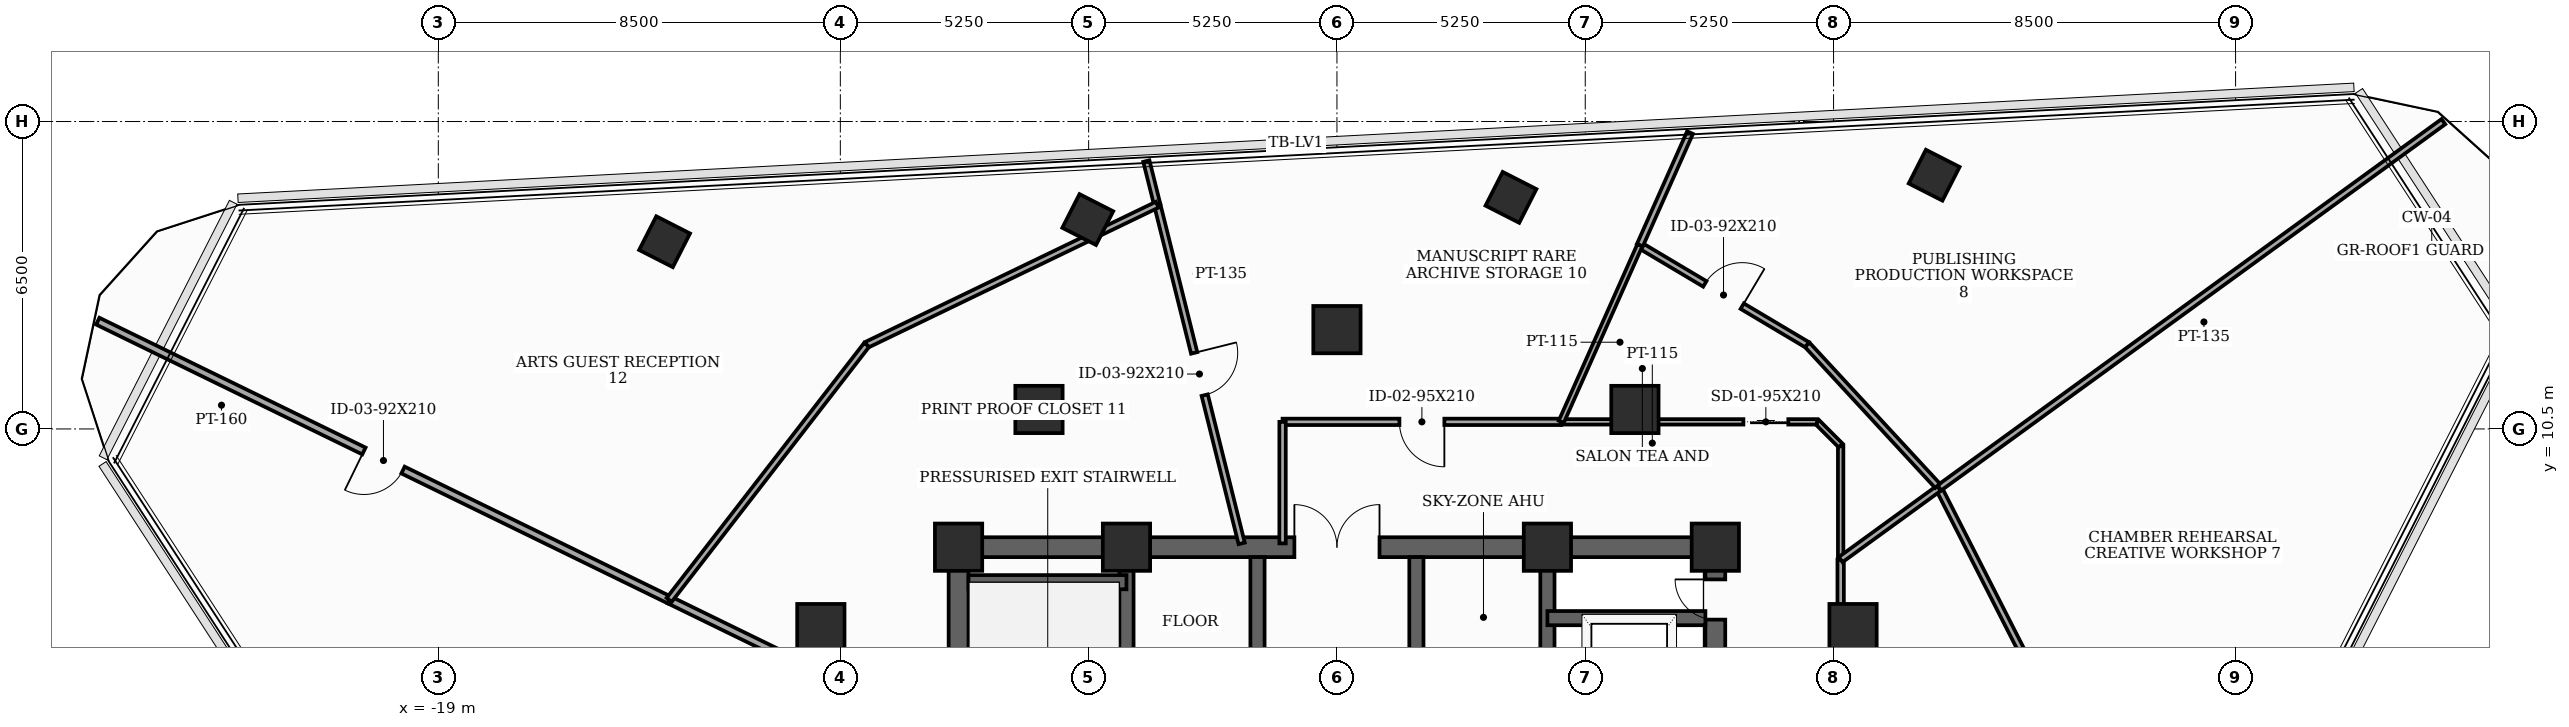
"""IFC4 building model, lengths in metres.
Left out: names, types, materials, properties, quantities, classifications, styles, units other than length and angle.
Written with IfcOpenShell. Run it as: python <this file> out.ifc"""

import sys

from ifc_helpers import new_model, si_unit, direction, frame, frame_2d, origin, origin_2d, place, context, subcontext, project, spatial, rectangle, extrude, element, fill, save


model = new_model("IFC4")
c1 = context("Model", 3, precision=1e-05, world=origin(), true_north=direction((0.0, 1.0)))
c2 = subcontext(c1, "Body", "Model", "MODEL_VIEW")
j1 = project(units=[si_unit("LENGTHUNIT", "METRE"), si_unit("PLANEANGLEUNIT", "RADIAN")], contexts=[c1])
p1 = place(None, origin())
s1 = spatial("IfcSite", under=j1, at=p1, CompositionType="ELEMENT")
p2 = place(p1, origin())
s2 = spatial("IfcBuilding", under=s1, at=p2, CompositionType="ELEMENT")
p3 = place(p2, frame((0.0, 0.0, 248.5)))
s3 = spatial("IfcBuildingStorey", under=s2, at=p3, CompositionType="ELEMENT", Elevation=248.5)
for number, where, z_axis, x_axis in (
    (1, (8.0, 8.0, 0.0), (0.0, 0.0, 1.0), (1.0, 0.0, 0.0)),
    (2, (4.45, 8.0, 0.0), (0.0, 0.0, 1.0), (1.0, 0.0, 0.0)),
    (3, (-4.45, 8.0, 0.0), (0.0, 0.0, 1.0), (1.0, 0.0, 0.0)),
    (4, (-8.0, 8.0, 0.0), (0.0, 0.0, 1.0), (1.0, 0.0, 0.0)),
    (5, (10.912, 6.3, 0.0), (0.0, 0.0, 1.0), (1.0, 0.0, 0.0)),
    (6, (6.3, 10.912, 0.0), (0.0, 0.0, 1.0), (1.0, 0.0, 0.0)),
    (7, (0.0, 12.6, 0.0), (0.0, 0.0, 1.0), (1.0, 0.0, 0.0)),
    (8, (-6.3, 10.912, 0.0), (0.0, 0.0, 1.0), (1.0, 0.0, 0.0)),
    (9, (-10.912, 6.3, 0.0), (0.0, 0.0, 1.0), (1.0, 0.0, 0.0)),
):
    element("IfcColumn", number, at=place(p3, frame(where, z_axis=z_axis, x_axis=x_axis)), inside=s3, PredefinedType="COLUMN", context=c2, shape_type="SweptSolid", body=[
        extrude(rectangle(XDim=1.0, YDim=1.0, at=origin_2d()), origin(), (0.0, 0.0, 1.0), 3.7),
    ])
for number, where, z_axis, x_axis in (
    (10, (12.627, 15.865, 0.0), (0.0, 0.0, 1.0), (0.454, 0.891, 0.0)),
    (11, (3.679, 15.396, 0.0), (0.0, 0.0, 1.0), (0.454, 0.891, 0.0)),
    (12, (-5.269, 14.927, 0.0), (0.0, 0.0, 1.0), (0.454, 0.891, 0.0)),
    (13, (-14.216, 14.458, 0.0), (0.0, 0.0, 1.0), (0.454, 0.891, 0.0)),
):
    element("IfcColumn", number, at=place(p3, frame(where, z_axis=z_axis, x_axis=x_axis)), inside=s3, PredefinedType="COLUMN", context=c2, shape_type="SweptSolid", body=[
        extrude(rectangle(XDim=0.8, YDim=0.8, at=origin_2d()), origin(), (0.0, 0.0, 1.0), 3.7),
    ])
p4 = place(p3, frame((-8.0, -8.0, 0.0), z_axis=(0.0, 0.0, 1.0), x_axis=(0.0, 1.0, 0.0)))
e14 = element("IfcWall", 14, at=p4, inside=s3, PredefinedType="SHEAR", context=c2, shape_type="SweptSolid", body=[
    extrude(rectangle(XDim=16.0, YDim=0.42, at=frame_2d((8.0, 0.0))), origin(), (0.0, 0.0, 1.0), 3.5),
])
p5 = place(p4, frame((0.681, 0.0, 0.0)))
e15 = element("IfcOpeningElement", 15, at=p5, cuts=e14, PredefinedType="OPENING", context=c2, shape_type="SweptSolid", body=[
    extrude(rectangle(XDim=0.85, YDim=2.02, at=frame_2d((0.425, 1.01))), frame((0.0, 0.22, 0.0), z_axis=(0.0, -1.0, 0.0), x_axis=(1.0, 0.0, 0.0)), (0.0, 0.0, 1.0), 0.44),
])
p6 = place(p4, frame((5.35, 0.0, 0.0)))
e16 = element("IfcOpeningElement", 16, at=p6, cuts=e14, PredefinedType="OPENING", context=c2, shape_type="SweptSolid", body=[
    extrude(rectangle(XDim=1.05, YDim=2.15, at=frame_2d((0.525, 1.075))), frame((0.0, 0.22, 0.0), z_axis=(0.0, -1.0, 0.0), x_axis=(1.0, 0.0, 0.0)), (0.0, 0.0, 1.0), 0.44),
])
p7 = place(p3, frame((8.0, -8.0, 0.0), z_axis=(0.0, 0.0, 1.0), x_axis=(0.0, 1.0, 0.0)))
e17 = element("IfcWall", 17, at=p7, inside=s3, PredefinedType="SHEAR", context=c2, shape_type="SweptSolid", body=[
    extrude(rectangle(XDim=16.0, YDim=0.42, at=frame_2d((8.0, 0.0))), origin(), (0.0, 0.0, 1.0), 3.5),
])
p8 = place(p7, frame((9.6, 0.0, 0.0)))
e18 = element("IfcOpeningElement", 18, at=p8, cuts=e17, PredefinedType="OPENING", context=c2, shape_type="SweptSolid", body=[
    extrude(rectangle(XDim=1.05, YDim=2.15, at=frame_2d((0.525, 1.075))), frame((0.0, 0.22, 0.0), z_axis=(0.0, -1.0, 0.0), x_axis=(1.0, 0.0, 0.0)), (0.0, 0.0, 1.0), 0.44),
])
p9 = place(p7, frame((14.469, 0.0, 0.0)))
e19 = element("IfcOpeningElement", 19, at=p9, cuts=e17, PredefinedType="OPENING", context=c2, shape_type="SweptSolid", body=[
    extrude(rectangle(XDim=0.85, YDim=2.02, at=frame_2d((0.425, 1.01))), frame((0.0, 0.22, 0.0), z_axis=(0.0, -1.0, 0.0), x_axis=(1.0, 0.0, 0.0)), (0.0, 0.0, 1.0), 0.44),
])
p10 = place(p3, frame((-8.0, 8.0, 0.0), z_axis=(0.0, 0.0, 1.0), x_axis=(1.0, 0.0, 0.0)))
e20 = element("IfcWall", 20, at=p10, inside=s3, PredefinedType="SHEAR", context=c2, shape_type="SweptSolid", body=[
    extrude(rectangle(XDim=16.0, YDim=0.42, at=frame_2d((8.0, 0.0))), origin(), (0.0, 0.0, 1.0), 3.5),
])
p11 = place(p10, frame((7.1, 0.0, 0.0)))
e21 = element("IfcOpeningElement", 21, at=p11, cuts=e20, PredefinedType="OPENING", context=c2, shape_type="SweptSolid", body=[
    extrude(rectangle(XDim=1.8, YDim=2.15, at=frame_2d((0.9, 1.075))), frame((0.0, 0.22, 0.0), z_axis=(0.0, -1.0, 0.0), x_axis=(1.0, 0.0, 0.0)), (0.0, 0.0, 1.0), 0.44),
])
for number, where, z_axis, x_axis in (
    (22, (-4.45, -7.79, 0.0), (0.0, 0.0, 1.0), (0.0, 1.0, 0.0)),
    (23, (4.45, -7.79, 0.0), (0.0, 0.0, 1.0), (0.0, 1.0, 0.0)),
):
    element("IfcWall", number, at=place(p3, frame(where, z_axis=z_axis, x_axis=x_axis)), inside=s3, PredefinedType="SHEAR", context=c2, shape_type="SweptSolid", body=[
        extrude(rectangle(XDim=15.58, YDim=0.3, at=frame_2d((7.79, 0.0))), origin(), (0.0, 0.0, 1.0), 3.5),
    ])
for number, where, z_axis, x_axis in (
    (24, (-7.79, 7.26, 0.0), (0.0, 0.0, 1.0), (1.0, 0.0, 0.0)),
    (25, (4.45, 6.5, 0.0), (0.0, 0.0, 1.0), (1.0, 0.0, 0.0)),
):
    element("IfcWall", number, at=place(p3, frame(where, z_axis=z_axis, x_axis=x_axis)), inside=s3, PredefinedType="SHEAR", context=c2, shape_type="SweptSolid", body=[
        extrude(rectangle(XDim=3.34, YDim=0.3, at=frame_2d((1.67, 0.0))), origin(), (0.0, 0.0, 1.0), 3.5),
    ])
p12 = place(p3, frame((-1.68, -4.85, 0.0), z_axis=(0.0, 0.0, 1.0), x_axis=(0.0, 1.0, 0.0)))
e26 = element("IfcWall", 26, at=p12, inside=s3, PredefinedType="SHEAR", context=c2, shape_type="SweptSolid", body=[
    extrude(rectangle(XDim=12.64, YDim=0.3, at=frame_2d((6.32, 0.0))), origin(), (0.0, 0.0, 1.0), 3.5),
])
p13 = place(p12, frame((2.6, 0.0, 0.0)))
e27 = element("IfcOpeningElement", 27, at=p13, cuts=e26, PredefinedType="OPENING", context=c2, shape_type="SweptSolid", body=[
    extrude(rectangle(XDim=0.95, YDim=2.1, at=frame_2d((0.475, 1.05))), frame((0.0, 0.16, 0.0), z_axis=(0.0, -1.0, 0.0), x_axis=(1.0, 0.0, 0.0)), (0.0, 0.0, 1.0), 0.32),
])
p14 = place(p12, frame((8.8, 0.0, 0.0)))
e28 = element("IfcOpeningElement", 28, at=p14, cuts=e26, PredefinedType="OPENING", context=c2, shape_type="SweptSolid", body=[
    extrude(rectangle(XDim=0.95, YDim=2.1, at=frame_2d((0.475, 1.05))), frame((0.0, 0.16, 0.0), z_axis=(0.0, -1.0, 0.0), x_axis=(1.0, 0.0, 0.0)), (0.0, 0.0, 1.0), 0.32),
])
p15 = place(p3, frame((1.68, -4.85, 0.0), z_axis=(0.0, 0.0, 1.0), x_axis=(0.0, 1.0, 0.0)))
e29 = element("IfcWall", 29, at=p15, inside=s3, PredefinedType="SHEAR", context=c2, shape_type="SweptSolid", body=[
    extrude(rectangle(XDim=12.64, YDim=0.3, at=frame_2d((6.32, 0.0))), origin(), (0.0, 0.0, 1.0), 3.5),
])
p16 = place(p15, frame((0.55, 0.0, 0.0)))
e30 = element("IfcOpeningElement", 30, at=p16, cuts=e29, PredefinedType="OPENING", context=c2, shape_type="SweptSolid", body=[
    extrude(rectangle(XDim=1.1, YDim=2.1, at=frame_2d((0.55, 1.05))), frame((0.0, 0.16, 0.0), z_axis=(0.0, -1.0, 0.0), x_axis=(1.0, 0.0, 0.0)), (0.0, 0.0, 1.0), 0.32),
])
p17 = place(p15, frame((2.65, 0.0, 0.0)))
e31 = element("IfcOpeningElement", 31, at=p17, cuts=e29, PredefinedType="OPENING", context=c2, shape_type="SweptSolid", body=[
    extrude(rectangle(XDim=1.1, YDim=2.1, at=frame_2d((0.55, 1.05))), frame((0.0, 0.16, 0.0), z_axis=(0.0, -1.0, 0.0), x_axis=(1.0, 0.0, 0.0)), (0.0, 0.0, 1.0), 0.32),
])
p18 = place(p15, frame((4.75, 0.0, 0.0)))
e32 = element("IfcOpeningElement", 32, at=p18, cuts=e29, PredefinedType="OPENING", context=c2, shape_type="SweptSolid", body=[
    extrude(rectangle(XDim=1.1, YDim=2.1, at=frame_2d((0.55, 1.05))), frame((0.0, 0.16, 0.0), z_axis=(0.0, -1.0, 0.0), x_axis=(1.0, 0.0, 0.0)), (0.0, 0.0, 1.0), 0.32),
])
p19 = place(p15, frame((8.9, 0.0, 0.0)))
e33 = element("IfcOpeningElement", 33, at=p19, cuts=e29, PredefinedType="OPENING", context=c2, shape_type="SweptSolid", body=[
    extrude(rectangle(XDim=0.95, YDim=2.1, at=frame_2d((0.475, 1.05))), frame((0.0, 0.16, 0.0), z_axis=(0.0, -1.0, 0.0), x_axis=(1.0, 0.0, 0.0)), (0.0, 0.0, 1.0), 0.32),
])
p20 = place(p3, frame((10.65, 4.225, 0.0), z_axis=(0.0, 0.0, 1.0), x_axis=(0.0, 1.0, 0.0)))
e34 = element("IfcWall", 34, at=p20, inside=s3, PredefinedType="PARTITIONING", context=c2, shape_type="SweptSolid", body=[
    extrude(rectangle(XDim=3.513, YDim=0.135, at=frame_2d((1.756, 0.0))), origin(), (0.0, 0.0, 1.0), 2.885),
])
p21 = place(p3, frame((10.65, 7.738, 0.0), z_axis=(0.0, 0.0, 1.0), x_axis=(0.0, 1.0, 0.0)))
e35 = element("IfcWall", 35, at=p21, inside=s3, PredefinedType="PARTITIONING", context=c2, shape_type="SweptSolid", body=[
    extrude(rectangle(XDim=2.412, YDim=0.115, at=frame_2d((1.206, 0.0))), origin(), (0.0, 0.0, 1.0), 3.5),
])
p22 = place(p3, frame((10.65, 10.15, 0.0), z_axis=(0.0, 0.0, 1.0), x_axis=(-0.707106781187, 0.707106781187, 0.0)))
e36 = element("IfcWall", 36, at=p22, inside=s3, PredefinedType="PARTITIONING", context=c2, shape_type="SweptSolid", body=[
    extrude(rectangle(XDim=0.707, YDim=0.115, at=frame_2d((0.354, 0.0))), origin(), (0.0, 0.0, 1.0), 3.5),
])
p23 = place(p3, frame((10.15, 10.65, 0.0), z_axis=(0.0, 0.0, 1.0), x_axis=(-1.0, 0.0, 0.0)))
e37 = element("IfcWall", 37, at=p23, inside=s3, PredefinedType="PARTITIONING", context=c2, shape_type="SweptSolid", body=[
    extrude(rectangle(XDim=5.408, YDim=0.115, at=frame_2d((2.704, 0.0))), origin(), (0.0, 0.0, 1.0), 2.885),
])
p24 = place(p23, frame((0.607, 0.0, 0.0)))
e38 = element("IfcOpeningElement", 38, at=p24, cuts=e37, PredefinedType="OPENING", context=c2, shape_type="SweptSolid", body=[
    extrude(rectangle(XDim=0.95, YDim=2.1, at=frame_2d((0.475, 1.05))), frame((0.0, 0.067, 0.0), z_axis=(0.0, -1.0, 0.0), x_axis=(1.0, 0.0, 0.0)), (0.0, 0.0, 1.0), 0.135),
])
p25 = place(p3, frame((4.742, 10.65, 0.0), z_axis=(0.0, 0.0, 1.0), x_axis=(-1.0, 0.0, 0.0)))
e39 = element("IfcWall", 39, at=p25, inside=s3, PredefinedType="PARTITIONING", context=c2, shape_type="SweptSolid", body=[
    extrude(rectangle(XDim=5.892, YDim=0.135, at=frame_2d((2.946, 0.0))), origin(), (0.0, 0.0, 1.0), 2.885),
])
p26 = place(p25, frame((2.471, 0.0, 0.0)))
e40 = element("IfcOpeningElement", 40, at=p26, cuts=e39, PredefinedType="OPENING", context=c2, shape_type="SweptSolid", body=[
    extrude(rectangle(XDim=0.95, YDim=2.1, at=frame_2d((0.475, 1.05))), frame((0.0, 0.077, 0.0), z_axis=(0.0, -1.0, 0.0), x_axis=(1.0, 0.0, 0.0)), (0.0, 0.0, 1.0), 0.155),
])
p27 = place(p3, frame((-1.15, 10.65, 0.0), z_axis=(0.0, 0.0, 1.0), x_axis=(0.0, -1.0, 0.0)))
e41 = element("IfcWall", 41, at=p27, inside=s3, PredefinedType="PARTITIONING", context=c2, shape_type="SweptSolid", body=[
    extrude(rectangle(XDim=2.57, YDim=0.135, at=frame_2d((1.285, 0.0))), origin(), (0.0, 0.0, 1.0), 2.885),
])
p28 = place(p3, frame((-8.08, 3.941, 0.0), z_axis=(0.0, 0.0, 1.0), x_axis=(-0.898794985177, 0.438369221798, 0.0)))
e42 = element("IfcWall", 42, at=p28, inside=s3, PredefinedType="PARTITIONING", context=c2, shape_type="SweptSolid", body=[
    extrude(rectangle(XDim=6.719, YDim=0.16, at=frame_2d((3.359, 0.0))), origin(), (0.0, 0.0, 1.0), 2.885),
])
p29 = place(p3, frame((-14.119, 6.886, 0.0), z_axis=(0.0, 0.0, 1.0), x_axis=(-0.898768620199, 0.438423274184, 0.0)))
e43 = element("IfcWall", 43, at=p29, inside=s3, PredefinedType="PARTITIONING", context=c2, shape_type="SweptSolid", body=[
    extrude(rectangle(XDim=13.442, YDim=0.16, at=frame_2d((6.721, 0.0))), origin(), (0.0, 0.0, 1.0), 3.035),
])
p30 = place(p29, frame((6.261, 0.0, 0.0)))
e44 = element("IfcOpeningElement", 44, at=p30, cuts=e43, PredefinedType="OPENING", context=c2, shape_type="SweptSolid", body=[
    extrude(rectangle(XDim=0.92, YDim=2.1, at=frame_2d((0.46, 1.05))), frame((0.0, 0.09, 0.0), z_axis=(0.0, -1.0, 0.0), x_axis=(1.0, 0.0, 0.0)), (0.0, 0.0, 1.0), 0.18),
])
p31 = place(p3, frame((15.149, 4.487, 0.0), z_axis=(0.0, 0.0, 1.0), x_axis=(-0.453912768225, 0.891046126102, 0.0)))
e45 = element("IfcWall", 45, at=p31, inside=s3, PredefinedType="PARTITIONING", context=c2, shape_type="SweptSolid", body=[
    extrude(rectangle(XDim=5.34, YDim=0.135, at=frame_2d((2.67, 0.0))), origin(), (0.0, 0.0, 1.0), 3.185),
])
p32 = place(p3, frame((12.725, 9.245, 0.0), z_axis=(0.0, 0.0, 1.0), x_axis=(-0.809135191367, -0.587622533683, 0.0)))
e46 = element("IfcWall", 46, at=p32, inside=s3, PredefinedType="PARTITIONING", context=c2, shape_type="SweptSolid", body=[
    extrude(rectangle(XDim=2.565, YDim=0.135, at=frame_2d((1.282, 0.0))), origin(), (0.0, 0.0, 1.0), 3.185),
])
p33 = place(p3, frame((23.394, 16.997, 0.0), z_axis=(0.0, 0.0, 1.0), x_axis=(-0.80901413128, -0.587789192985, 0.0)))
e47 = element("IfcWall", 47, at=p33, inside=s3, PredefinedType="PARTITIONING", context=c2, shape_type="SweptSolid", body=[
    extrude(rectangle(XDim=13.171, YDim=0.135, at=frame_2d((6.586, 0.0))), origin(), (0.0, 0.0, 1.0), 3.035),
])
p34 = place(p3, frame((6.404, 14.384, 0.0), z_axis=(0.0, 0.0, 1.0), x_axis=(0.859464079119, -0.511196143085, 0.0)))
e48 = element("IfcWall", 48, at=p34, inside=s3, PredefinedType="PARTITIONING", context=c2, shape_type="SweptSolid", body=[
    extrude(rectangle(XDim=4.118, YDim=0.135, at=frame_2d((2.059, 0.0))), origin(), (0.0, 0.0, 1.0), 3.035),
])
p35 = place(p34, frame((1.599, 0.0, 0.0)))
e49 = element("IfcOpeningElement", 49, at=p35, cuts=e48, PredefinedType="OPENING", context=c2, shape_type="SweptSolid", body=[
    extrude(rectangle(XDim=0.92, YDim=2.1, at=frame_2d((0.46, 1.05))), frame((0.0, 0.077, 0.0), z_axis=(0.0, -1.0, 0.0), x_axis=(1.0, 0.0, 0.0)), (0.0, 0.0, 1.0), 0.155),
])
p36 = place(p3, frame((9.943, 12.279, 0.0), z_axis=(0.0, 0.0, 1.0), x_axis=(0.678829604912, -0.734295831049, 0.0)))
e50 = element("IfcWall", 50, at=p36, inside=s3, PredefinedType="PARTITIONING", context=c2, shape_type="SweptSolid", body=[
    extrude(rectangle(XDim=4.058, YDim=0.135, at=frame_2d((2.029, 0.0))), origin(), (0.0, 0.0, 1.0), 3.185),
])
p37 = place(p3, frame((7.465, 16.766, 0.0), z_axis=(0.0, 0.0, 1.0), x_axis=(-0.406928703069, -0.913459922831, 0.0)))
e51 = element("IfcWall", 51, at=p37, inside=s3, PredefinedType="PARTITIONING", context=c2, shape_type="SweptSolid", body=[
    extrude(rectangle(XDim=2.608, YDim=0.135, at=frame_2d((1.304, 0.0))), origin(), (0.0, 0.0, 1.0), 3.035),
])
p38 = place(p3, frame((6.404, 14.384, 0.0), z_axis=(0.0, 0.0, 1.0), x_axis=(-0.406648271104, -0.913584798258, 0.0)))
e52 = element("IfcWall", 52, at=p38, inside=s3, PredefinedType="PARTITIONING", context=c2, shape_type="SweptSolid", body=[
    extrude(rectangle(XDim=4.087, YDim=0.115, at=frame_2d((2.044, 0.0))), origin(), (0.0, 0.0, 1.0), 2.885),
])
p39 = place(p3, frame((-3.8, 15.242, 0.0), z_axis=(0.0, 0.0, 1.0), x_axis=(0.241889603588, -0.970303777008, 0.0)))
e53 = element("IfcWall", 53, at=p39, inside=s3, PredefinedType="PARTITIONING", context=c2, shape_type="SweptSolid", body=[
    extrude(rectangle(XDim=7.381, YDim=0.135, at=frame_2d((3.69, 0.0))), origin(), (0.0, 0.0, 1.0), 2.885),
])
p40 = place(p39, frame((3.231, 0.0, 0.0)))
e54 = element("IfcOpeningElement", 54, at=p40, cuts=e53, PredefinedType="OPENING", context=c2, shape_type="SweptSolid", body=[
    extrude(rectangle(XDim=0.92, YDim=2.1, at=frame_2d((0.46, 1.05))), frame((0.0, 0.077, 0.0), z_axis=(0.0, -1.0, 0.0), x_axis=(1.0, 0.0, 0.0)), (0.0, 0.0, 1.0), 0.155),
])
p41 = place(p3, frame((-4.03, 16.164, 0.0), z_axis=(0.0, 0.0, 1.0), x_axis=(0.241809991188, -0.970323620326, 0.0)))
e55 = element("IfcWall", 55, at=p41, inside=s3, PredefinedType="PARTITIONING", context=c2, shape_type="SweptSolid", body=[
    extrude(rectangle(XDim=0.95, YDim=0.135, at=frame_2d((0.475, 0.0))), origin(), (0.0, 0.0, 1.0), 3.5),
])
p42 = place(p3, frame((-3.8, 15.242, 0.0), z_axis=(0.0, 0.0, 1.0), x_axis=(-0.900708156853, -0.434424695635, 0.0)))
e56 = element("IfcWall", 56, at=p42, inside=s3, PredefinedType="PARTITIONING", context=c2, shape_type="SweptSolid", body=[
    extrude(rectangle(XDim=6.82, YDim=0.135, at=frame_2d((3.41, 0.0))), origin(), (0.0, 0.0, 1.0), 3.035),
])
p43 = place(p3, frame((-9.943, 12.279, 0.0), z_axis=(0.0, 0.0, 1.0), x_axis=(-0.612219395693, -0.790687935621, 0.0)))
e57 = element("IfcWall", 57, at=p43, inside=s3, PredefinedType="PARTITIONING", context=c2, shape_type="SweptSolid", body=[
    extrude(rectangle(XDim=6.821, YDim=0.135, at=frame_2d((3.41, 0.0))), origin(), (0.0, 0.0, 1.0), 3.185),
])
p44 = place(p9, origin())
e58 = element("IfcDoor", 58, at=p44, inside=s3, OperationType="SINGLE_SWING_RIGHT", PredefinedType="TRAPDOOR", context=c2, shape_type="SweptSolid", body=[
    extrude(rectangle(XDim=0.85, YDim=2.02, at=frame_2d((0.425, 1.01))), frame((0.0, 0.025, 0.0), z_axis=(0.0, -1.0, 0.0), x_axis=(1.0, 0.0, 0.0)), (0.0, 0.0, 1.0), 0.05),
])
fill(e19, e58)
p45 = place(p11, origin())
e59 = element("IfcDoor", 59, at=p45, inside=s3, OperationType="DOUBLE_DOOR_SINGLE_SWING", PredefinedType="DOOR", context=c2, shape_type="SweptSolid", body=[
    extrude(rectangle(XDim=1.8, YDim=2.15, at=frame_2d((0.9, 1.075))), frame((0.0, 0.025, 0.0), z_axis=(0.0, -1.0, 0.0), x_axis=(1.0, 0.0, 0.0)), (0.0, 0.0, 1.0), 0.05),
])
fill(e21, e59)
p46 = place(p24, origin())
e60 = element("IfcDoor", 60, at=p46, inside=s3, OperationType="SLIDING_TO_LEFT", PredefinedType="DOOR", context=c2, shape_type="SweptSolid", body=[
    extrude(rectangle(XDim=0.95, YDim=2.1, at=frame_2d((0.475, 1.05))), frame((0.0, 0.025, 0.0), z_axis=(0.0, -1.0, 0.0), x_axis=(1.0, 0.0, 0.0)), (0.0, 0.0, 1.0), 0.05),
])
fill(e38, e60)
p47 = place(p26, origin())
e61 = element("IfcDoor", 61, at=p47, inside=s3, OperationType="SINGLE_SWING_LEFT", PredefinedType="DOOR", context=c2, shape_type="SweptSolid", body=[
    extrude(rectangle(XDim=0.95, YDim=2.1, at=frame_2d((0.475, 1.05))), frame((0.0, 0.025, 0.0), z_axis=(0.0, -1.0, 0.0), x_axis=(1.0, 0.0, 0.0)), (0.0, 0.0, 1.0), 0.05),
])
fill(e40, e61)
p48 = place(p30, origin())
e62 = element("IfcDoor", 62, at=p48, inside=s3, OperationType="SINGLE_SWING_RIGHT", PredefinedType="DOOR", context=c2, shape_type="SweptSolid", body=[
    extrude(rectangle(XDim=0.92, YDim=2.1, at=frame_2d((0.46, 1.05))), frame((0.0, 0.025, 0.0), z_axis=(0.0, -1.0, 0.0), x_axis=(1.0, 0.0, 0.0)), (0.0, 0.0, 1.0), 0.05),
])
fill(e44, e62)
p49 = place(p35, origin())
e63 = element("IfcDoor", 63, at=p49, inside=s3, OperationType="SINGLE_SWING_RIGHT", PredefinedType="DOOR", context=c2, shape_type="SweptSolid", body=[
    extrude(rectangle(XDim=0.92, YDim=2.1, at=frame_2d((0.46, 1.05))), frame((0.0, 0.025, 0.0), z_axis=(0.0, -1.0, 0.0), x_axis=(1.0, 0.0, 0.0)), (0.0, 0.0, 1.0), 0.05),
])
fill(e49, e63)
p50 = place(p40, origin())
e64 = element("IfcDoor", 64, at=p50, inside=s3, OperationType="SINGLE_SWING_LEFT", PredefinedType="DOOR", context=c2, shape_type="SweptSolid", body=[
    extrude(rectangle(XDim=0.92, YDim=2.1, at=frame_2d((0.46, 1.05))), frame((0.0, 0.025, 0.0), z_axis=(0.0, -1.0, 0.0), x_axis=(1.0, 0.0, 0.0)), (0.0, 0.0, 1.0), 0.05),
])
fill(e54, e64)
save(model, sys.argv[1])
